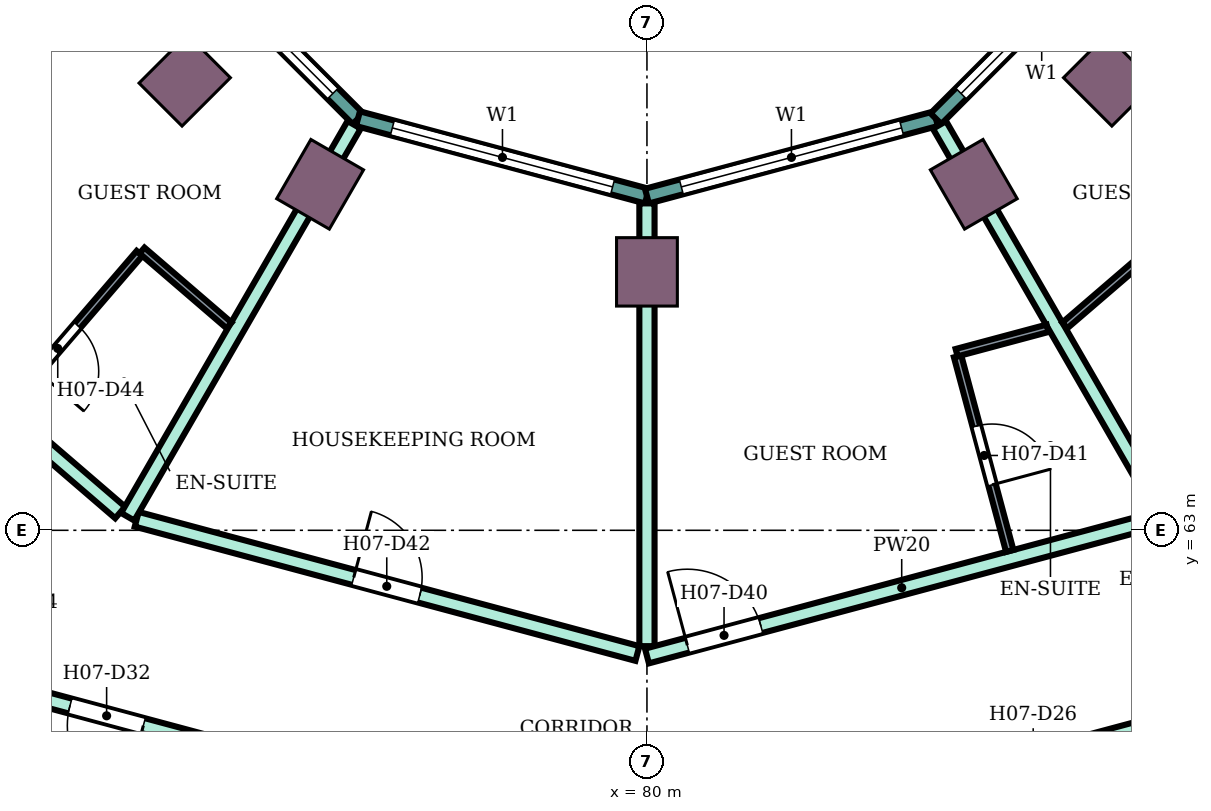
"""IFC4 building model, lengths in metres.
Left out: names, types, materials, properties, quantities, classifications, styles, units other than length and angle.
Written with IfcOpenShell. Run it as: python <this file> out.ifc"""

import sys

from ifc_helpers import new_model, si_unit, direction, frame, frame_2d, origin, origin_2d, place, context, subcontext, project, spatial, rectangle, extrude, element, fill, save


model = new_model("IFC4")
c1 = context("Model", 3, precision=1e-05, world=origin(), true_north=direction((0.0, 1.0)))
c2 = subcontext(c1, "Body", "Model", "MODEL_VIEW")
j1 = project(units=[si_unit("LENGTHUNIT", "METRE"), si_unit("PLANEANGLEUNIT", "RADIAN")], contexts=[c1])
p1 = place(None, origin())
s1 = spatial("IfcSite", under=j1, at=p1, CompositionType="ELEMENT")
p2 = place(p1, origin())
s2 = spatial("IfcBuilding", under=s1, at=p2, CompositionType="ELEMENT")
p3 = place(p2, frame((0.0, 0.0, 105.2)))
s3 = spatial("IfcBuildingStorey", under=s2, at=p3, CompositionType="ELEMENT", Elevation=105.2)
for number, where, z_axis, x_axis in (
    (1, (73.919, 68.919, 0.0), (0.0, 0.0, 1.0), (-0.707, -0.707, 0.0)),
    (2, (75.7, 67.552, 0.0), (0.0, 0.0, 1.0), (-0.5, -0.866, 0.0)),
    (3, (80.0, 66.4, 0.0), (0.0, 0.0, 1.0), (0.0, -1.0, 0.0)),
    (4, (84.3, 67.552, 0.0), (0.0, 0.0, 1.0), (0.5, -0.866, 0.0)),
    (5, (86.081, 68.919, 0.0), (0.0, 0.0, 1.0), (0.707, -0.707, 0.0)),
):
    element("IfcColumn", number, at=place(p3, frame(where, z_axis=z_axis, x_axis=x_axis)), inside=s3, PredefinedType="COLUMN", context=c2, shape_type="SweptSolid", body=[
        extrude(rectangle(XDim=0.9, YDim=0.8, at=origin_2d()), origin(), (0.0, 0.0, 1.0), 3.8),
    ])
p4 = place(p3, frame((73.415, 71.198, 0.0), z_axis=(0.0, 0.0, 1.0), x_axis=(0.707106781187, -0.707106781187, 0.0)))
e6 = element("IfcWall", 6, at=p4, inside=s3, PredefinedType="NOTDEFINED", context=c2, shape_type="SweptSolid", body=[
    extrude(rectangle(XDim=3.936, YDim=0.2, at=frame_2d((1.968, 0.0))), origin(), (0.0, 0.0, 1.0), 3.8),
])
p5 = place(p4, frame((0.468, 0.0, 0.9)))
e7 = element("IfcOpeningElement", 7, at=p5, cuts=e6, PredefinedType="OPENING", context=c2, shape_type="SweptSolid", body=[
    extrude(rectangle(XDim=3.0, YDim=2.3, at=frame_2d((1.5, 1.15))), frame((0.0, 0.11, 0.0), z_axis=(0.0, -1.0, 0.0), x_axis=(1.0, 0.0, 0.0)), (0.0, 0.0, 1.0), 0.22),
])
p6 = place(p3, frame((76.198, 68.415, 0.0), z_axis=(0.0, 0.0, 1.0), x_axis=(0.965933654434, -0.258789828301, 0.0)))
e8 = element("IfcWall", 8, at=p6, inside=s3, PredefinedType="NOTDEFINED", context=c2, shape_type="SweptSolid", body=[
    extrude(rectangle(XDim=3.936, YDim=0.2, at=frame_2d((1.968, 0.0))), origin(), (0.0, 0.0, 1.0), 3.8),
])
p7 = place(p6, frame((0.468, 0.0, 0.9)))
e9 = element("IfcOpeningElement", 9, at=p7, cuts=e8, PredefinedType="OPENING", context=c2, shape_type="SweptSolid", body=[
    extrude(rectangle(XDim=3.0, YDim=2.3, at=frame_2d((1.5, 1.15))), frame((0.0, 0.11, 0.0), z_axis=(0.0, -1.0, 0.0), x_axis=(1.0, 0.0, 0.0)), (0.0, 0.0, 1.0), 0.22),
])
p8 = place(p3, frame((80.0, 67.396, 0.0), z_axis=(0.0, 0.0, 1.0), x_axis=(0.965933654434, 0.258789828301, 0.0)))
e10 = element("IfcWall", 10, at=p8, inside=s3, PredefinedType="NOTDEFINED", context=c2, shape_type="SweptSolid", body=[
    extrude(rectangle(XDim=3.936, YDim=0.2, at=frame_2d((1.968, 0.0))), origin(), (0.0, 0.0, 1.0), 3.8),
])
p9 = place(p8, frame((0.468, 0.0, 0.9)))
e11 = element("IfcOpeningElement", 11, at=p9, cuts=e10, PredefinedType="OPENING", context=c2, shape_type="SweptSolid", body=[
    extrude(rectangle(XDim=3.0, YDim=2.3, at=frame_2d((1.5, 1.15))), frame((0.0, 0.11, 0.0), z_axis=(0.0, -1.0, 0.0), x_axis=(1.0, 0.0, 0.0)), (0.0, 0.0, 1.0), 0.22),
])
p10 = place(p3, frame((83.802, 68.415, 0.0), z_axis=(0.0, 0.0, 1.0), x_axis=(0.707106781187, 0.707106781187, 0.0)))
e12 = element("IfcWall", 12, at=p10, inside=s3, PredefinedType="NOTDEFINED", context=c2, shape_type="SweptSolid", body=[
    extrude(rectangle(XDim=3.936, YDim=0.2, at=frame_2d((1.968, 0.0))), origin(), (0.0, 0.0, 1.0), 3.8),
])
p11 = place(p10, frame((0.468, 0.0, 0.9)))
e13 = element("IfcOpeningElement", 13, at=p11, cuts=e12, PredefinedType="OPENING", context=c2, shape_type="SweptSolid", body=[
    extrude(rectangle(XDim=3.0, YDim=2.3, at=frame_2d((1.5, 1.15))), frame((0.0, 0.11, 0.0), z_axis=(0.0, -1.0, 0.0), x_axis=(1.0, 0.0, 0.0)), (0.0, 0.0, 1.0), 0.22),
])
p12 = place(p3, frame((69.158, 66.6, 0.0), z_axis=(0.0, 0.0, 1.0), x_axis=(0.757976058094, -0.652282373943, 0.0)))
e14 = element("IfcWall", 14, at=p12, inside=s3, PredefinedType="PARTITIONING", context=c2, shape_type="SweptSolid", body=[
    extrude(rectangle(XDim=5.16, YDim=0.2, at=frame_2d((2.58, 0.0))), origin(), (0.0, 0.0, 1.0), 3.35),
])
p13 = place(p12, frame((1.6, 0.0, 0.0)))
e15 = element("IfcOpeningElement", 15, at=p13, cuts=e14, PredefinedType="OPENING", context=c2, shape_type="SweptSolid", body=[
    extrude(rectangle(XDim=1.0, YDim=2.1, at=frame_2d((0.5, 1.05))), frame((0.0, 0.11, 0.0), z_axis=(0.0, -1.0, 0.0), x_axis=(1.0, 0.0, 0.0)), (0.0, 0.0, 1.0), 0.22),
])
p14 = place(p3, frame((71.877, 60.832, 0.0), z_axis=(0.0, 0.0, 1.0), x_axis=(0.965852509869, -0.259092510851, 0.0)))
e16 = element("IfcWall", 16, at=p14, inside=s3, PredefinedType="PARTITIONING", context=c2, shape_type="SweptSolid", body=[
    extrude(rectangle(XDim=8.32, YDim=0.2, at=frame_2d((4.16, 0.0))), origin(), (0.0, 0.0, 1.0), 3.35),
])
p15 = place(p14, frame((6.86, 0.0, 0.0)))
e17 = element("IfcOpeningElement", 17, at=p15, cuts=e16, PredefinedType="OPENING", context=c2, shape_type="SweptSolid", body=[
    extrude(rectangle(XDim=1.0, YDim=2.1, at=frame_2d((0.5, 1.05))), frame((0.0, 0.11, 0.0), z_axis=(0.0, -1.0, 0.0), x_axis=(1.0, 0.0, 0.0)), (0.0, 0.0, 1.0), 0.22),
])
p16 = place(p14, frame((0.55, 0.0, 0.0)))
e18 = element("IfcOpeningElement", 18, at=p16, cuts=e16, PredefinedType="OPENING", context=c2, shape_type="SweptSolid", body=[
    extrude(rectangle(XDim=1.0, YDim=2.1, at=frame_2d((0.5, 1.05))), frame((0.0, 0.11, 0.0), z_axis=(0.0, -1.0, 0.0), x_axis=(1.0, 0.0, 0.0)), (0.0, 0.0, 1.0), 0.22),
])
p17 = place(p3, frame((73.287, 63.145, 0.0), z_axis=(0.0, 0.0, 1.0), x_axis=(0.965906180248, -0.258892353997, 0.0)))
e19 = element("IfcWall", 19, at=p17, inside=s3, PredefinedType="PARTITIONING", context=c2, shape_type="SweptSolid", body=[
    extrude(rectangle(XDim=6.82, YDim=0.2, at=frame_2d((3.41, 0.0))), origin(), (0.0, 0.0, 1.0), 3.35),
])
p18 = place(p17, frame((2.956, 0.0, 0.0)))
e20 = element("IfcOpeningElement", 20, at=p18, cuts=e19, PredefinedType="OPENING", context=c2, shape_type="SweptSolid", body=[
    extrude(rectangle(XDim=0.9, YDim=2.1, at=frame_2d((0.45, 1.05))), frame((0.0, 0.11, 0.0), z_axis=(0.0, -1.0, 0.0), x_axis=(1.0, 0.0, 0.0)), (0.0, 0.0, 1.0), 0.22),
])
p19 = place(p3, frame((73.169, 63.178, 0.0), z_axis=(0.0, 0.0, 1.0), x_axis=(0.500257106344, 0.865876912472, 0.0)))
e21 = element("IfcWall", 21, at=p19, inside=s3, PredefinedType="PARTITIONING", context=c2, shape_type="SweptSolid", body=[
    extrude(rectangle(XDim=5.955, YDim=0.2, at=frame_2d((2.978, 0.0))), origin(), (0.0, 0.0, 1.0), 3.35),
])
p20 = place(p3, frame((80.0, 58.654, 0.0), z_axis=(0.0, 0.0, 1.0), x_axis=(0.965979808777, 0.25861749561, 0.0)))
e22 = element("IfcWall", 22, at=p20, inside=s3, PredefinedType="PARTITIONING", context=c2, shape_type="SweptSolid", body=[
    extrude(rectangle(XDim=8.37, YDim=0.2, at=frame_2d((4.185, 0.0))), origin(), (0.0, 0.0, 1.0), 3.35),
])
p21 = place(p20, frame((4.76, 0.0, 0.0)))
e23 = element("IfcOpeningElement", 23, at=p21, cuts=e22, PredefinedType="OPENING", context=c2, shape_type="SweptSolid", body=[
    extrude(rectangle(XDim=1.0, YDim=2.1, at=frame_2d((0.5, 1.05))), frame((0.0, 0.11, 0.0), z_axis=(0.0, -1.0, 0.0), x_axis=(1.0, 0.0, 0.0)), (0.0, 0.0, 1.0), 0.22),
])
p22 = place(p20, frame((0.55, 0.0, 0.0)))
e24 = element("IfcOpeningElement", 24, at=p22, cuts=e22, PredefinedType="OPENING", context=c2, shape_type="SweptSolid", body=[
    extrude(rectangle(XDim=1.0, YDim=2.1, at=frame_2d((0.5, 1.05))), frame((0.0, 0.11, 0.0), z_axis=(0.0, -1.0, 0.0), x_axis=(1.0, 0.0, 0.0)), (0.0, 0.0, 1.0), 0.22),
])
p23 = place(p3, frame((80.0, 61.476, 0.0), z_axis=(0.0, 0.0, 1.0), x_axis=(0.0, 1.0, 0.0)))
e25 = element("IfcWall", 25, at=p23, inside=s3, PredefinedType="PARTITIONING", context=c2, shape_type="SweptSolid", body=[
    extrude(rectangle(XDim=5.825, YDim=0.2, at=frame_2d((2.913, 0.0))), origin(), (0.0, 0.0, 1.0), 3.35),
])
p24 = place(p3, frame((80.0, 61.346, 0.0), z_axis=(0.0, 0.0, 1.0), x_axis=(0.965924181808, 0.258825182312, 0.0)))
e26 = element("IfcWall", 26, at=p24, inside=s3, PredefinedType="PARTITIONING", context=c2, shape_type="SweptSolid", body=[
    extrude(rectangle(XDim=6.94, YDim=0.2, at=frame_2d((3.47, 0.0))), origin(), (0.0, 0.0, 1.0), 3.35),
])
p25 = place(p24, frame((0.55, 0.0, 0.0)))
e27 = element("IfcOpeningElement", 27, at=p25, cuts=e26, PredefinedType="OPENING", context=c2, shape_type="SweptSolid", body=[
    extrude(rectangle(XDim=1.0, YDim=2.1, at=frame_2d((0.5, 1.05))), frame((0.0, 0.11, 0.0), z_axis=(0.0, -1.0, 0.0), x_axis=(1.0, 0.0, 0.0)), (0.0, 0.0, 1.0), 0.22),
])
p26 = place(p3, frame((83.849, 68.333, 0.0), z_axis=(0.0, 0.0, 1.0), x_axis=(0.499901724708, -0.866082135617, 0.0)))
e28 = element("IfcWall", 28, at=p26, inside=s3, PredefinedType="PARTITIONING", context=c2, shape_type="SweptSolid", body=[
    extrude(rectangle(XDim=5.855, YDim=0.2, at=frame_2d((2.928, 0.0))), origin(), (0.0, 0.0, 1.0), 3.35),
])
p27 = place(p3, frame((71.596, 64.635, 0.0), z_axis=(0.0, 0.0, 1.0), x_axis=(0.652285007511, 0.757973791748, 0.0)))
e29 = element("IfcWall", 29, at=p27, inside=s3, PredefinedType="PARTITIONING", context=c2, shape_type="SweptSolid", body=[
    extrude(rectangle(XDim=2.65, YDim=0.1, at=frame_2d((1.325, 0.0))), origin(), (0.0, 0.0, 1.0), 3.35),
])
p28 = place(p27, frame((0.6, 0.0, 0.0)))
e30 = element("IfcOpeningElement", 30, at=p28, cuts=e29, PredefinedType="OPENING", context=c2, shape_type="SweptSolid", body=[
    extrude(rectangle(XDim=0.8, YDim=2.1, at=frame_2d((0.4, 1.05))), frame((0.0, 0.06, 0.0), z_axis=(0.0, -1.0, 0.0), x_axis=(1.0, 0.0, 0.0)), (0.0, 0.0, 1.0), 0.12),
])
p29 = place(p3, frame((73.357, 66.681, 0.0), z_axis=(0.0, 0.0, 1.0), x_axis=(0.758263469747, -0.651948242154, 0.0)))
e31 = element("IfcWall", 31, at=p29, inside=s3, PredefinedType="PARTITIONING", context=c2, shape_type="SweptSolid", body=[
    extrude(rectangle(XDim=1.511, YDim=0.1, at=frame_2d((0.755, 0.0))), origin(), (0.0, 0.0, 1.0), 3.35),
])
p30 = place(p3, frame((84.087, 65.289, 0.0), z_axis=(0.0, 0.0, 1.0), x_axis=(0.258929459649, -0.965896234037, 0.0)))
e32 = element("IfcWall", 32, at=p30, inside=s3, PredefinedType="PARTITIONING", context=c2, shape_type="SweptSolid", body=[
    extrude(rectangle(XDim=2.65, YDim=0.1, at=frame_2d((1.325, 0.0))), origin(), (0.0, 0.0, 1.0), 3.35),
])
p31 = place(p30, frame((0.95, 0.0, 0.0)))
e33 = element("IfcOpeningElement", 33, at=p31, cuts=e32, PredefinedType="OPENING", context=c2, shape_type="SweptSolid", body=[
    extrude(rectangle(XDim=0.8, YDim=2.1, at=frame_2d((0.4, 1.05))), frame((0.0, 0.06, 0.0), z_axis=(0.0, -1.0, 0.0), x_axis=(1.0, 0.0, 0.0)), (0.0, 0.0, 1.0), 0.12),
])
p32 = place(p3, frame((84.074, 65.337, 0.0), z_axis=(0.0, 0.0, 1.0), x_axis=(0.965949810352, 0.258729518766, 0.0)))
e34 = element("IfcWall", 34, at=p32, inside=s3, PredefinedType="PARTITIONING", context=c2, shape_type="SweptSolid", body=[
    extrude(rectangle(XDim=1.239, YDim=0.1, at=frame_2d((0.62, 0.0))), origin(), (0.0, 0.0, 1.0), 3.35),
])
p33 = place(p3, frame((85.497, 65.696, 0.0), z_axis=(0.0, 0.0, 1.0), x_axis=(0.75817032582, 0.652056559698, 0.0)))
e35 = element("IfcWall", 35, at=p33, inside=s3, PredefinedType="PARTITIONING", context=c2, shape_type="SweptSolid", body=[
    extrude(rectangle(XDim=1.461, YDim=0.1, at=frame_2d((0.73, 0.0))), origin(), (0.0, 0.0, 1.0), 3.35),
])
p34 = place(p5, origin())
e36 = element("IfcWindow", 36, at=p34, inside=s3, PartitioningType="SINGLE_PANEL", PredefinedType="WINDOW", context=c2, shape_type="SweptSolid", body=[
    extrude(rectangle(XDim=3.0, YDim=2.3, at=frame_2d((1.5, 1.15))), frame((0.0, 0.03, 0.0), z_axis=(0.0, -1.0, 0.0), x_axis=(1.0, 0.0, 0.0)), (0.0, 0.0, 1.0), 0.06),
])
fill(e7, e36)
p35 = place(p7, origin())
e37 = element("IfcWindow", 37, at=p35, inside=s3, PartitioningType="SINGLE_PANEL", PredefinedType="WINDOW", context=c2, shape_type="SweptSolid", body=[
    extrude(rectangle(XDim=3.0, YDim=2.3, at=frame_2d((1.5, 1.15))), frame((0.0, 0.03, 0.0), z_axis=(0.0, -1.0, 0.0), x_axis=(1.0, 0.0, 0.0)), (0.0, 0.0, 1.0), 0.06),
])
fill(e9, e37)
p36 = place(p9, origin())
e38 = element("IfcWindow", 38, at=p36, inside=s3, PartitioningType="SINGLE_PANEL", PredefinedType="WINDOW", context=c2, shape_type="SweptSolid", body=[
    extrude(rectangle(XDim=3.0, YDim=2.3, at=frame_2d((1.5, 1.15))), frame((0.0, 0.03, 0.0), z_axis=(0.0, -1.0, 0.0), x_axis=(1.0, 0.0, 0.0)), (0.0, 0.0, 1.0), 0.06),
])
fill(e11, e38)
p37 = place(p11, origin())
e39 = element("IfcWindow", 39, at=p37, inside=s3, PartitioningType="SINGLE_PANEL", PredefinedType="WINDOW", context=c2, shape_type="SweptSolid", body=[
    extrude(rectangle(XDim=3.0, YDim=2.3, at=frame_2d((1.5, 1.15))), frame((0.0, 0.03, 0.0), z_axis=(0.0, -1.0, 0.0), x_axis=(1.0, 0.0, 0.0)), (0.0, 0.0, 1.0), 0.06),
])
fill(e13, e39)
p38 = place(p16, frame((1.0, 0.0, 0.0), z_axis=(0.0, 0.0, 1.0), x_axis=(-1.0, 0.0, 0.0)))
e40 = element("IfcDoor", 40, at=p38, inside=s3, OperationType="SINGLE_SWING_LEFT", PredefinedType="DOOR", context=c2, shape_type="SweptSolid", body=[
    extrude(rectangle(XDim=1.0, YDim=2.1, at=frame_2d((0.5, 1.05))), frame((0.0, 0.025, 0.0), z_axis=(0.0, -1.0, 0.0), x_axis=(1.0, 0.0, 0.0)), (0.0, 0.0, 1.0), 0.05),
])
fill(e18, e40)
p39 = place(p25, origin())
e41 = element("IfcDoor", 41, at=p39, inside=s3, OperationType="SINGLE_SWING_LEFT", PredefinedType="DOOR", context=c2, shape_type="SweptSolid", body=[
    extrude(rectangle(XDim=1.0, YDim=2.1, at=frame_2d((0.5, 1.05))), frame((0.0, 0.025, 0.0), z_axis=(0.0, -1.0, 0.0), x_axis=(1.0, 0.0, 0.0)), (0.0, 0.0, 1.0), 0.05),
])
fill(e27, e41)
p40 = place(p31, origin())
e42 = element("IfcDoor", 42, at=p40, inside=s3, OperationType="SINGLE_SWING_RIGHT", PredefinedType="DOOR", context=c2, shape_type="SweptSolid", body=[
    extrude(rectangle(XDim=0.8, YDim=2.1, at=frame_2d((0.4, 1.05))), frame((0.0, 0.025, 0.0), z_axis=(0.0, -1.0, 0.0), x_axis=(1.0, 0.0, 0.0)), (0.0, 0.0, 1.0), 0.05),
])
fill(e33, e42)
p41 = place(p18, origin())
e43 = element("IfcDoor", 43, at=p41, inside=s3, OperationType="SINGLE_SWING_LEFT", PredefinedType="DOOR", context=c2, shape_type="SweptSolid", body=[
    extrude(rectangle(XDim=0.9, YDim=2.1, at=frame_2d((0.45, 1.05))), frame((0.0, 0.025, 0.0), z_axis=(0.0, -1.0, 0.0), x_axis=(1.0, 0.0, 0.0)), (0.0, 0.0, 1.0), 0.05),
])
fill(e20, e43)
p42 = place(p28, frame((0.8, 0.0, 0.0), z_axis=(0.0, 0.0, 1.0), x_axis=(-1.0, 0.0, 0.0)))
e44 = element("IfcDoor", 44, at=p42, inside=s3, OperationType="SINGLE_SWING_RIGHT", PredefinedType="DOOR", context=c2, shape_type="SweptSolid", body=[
    extrude(rectangle(XDim=0.8, YDim=2.1, at=frame_2d((0.4, 1.05))), frame((0.0, 0.025, 0.0), z_axis=(0.0, -1.0, 0.0), x_axis=(1.0, 0.0, 0.0)), (0.0, 0.0, 1.0), 0.05),
])
fill(e30, e44)
save(model, sys.argv[1])
